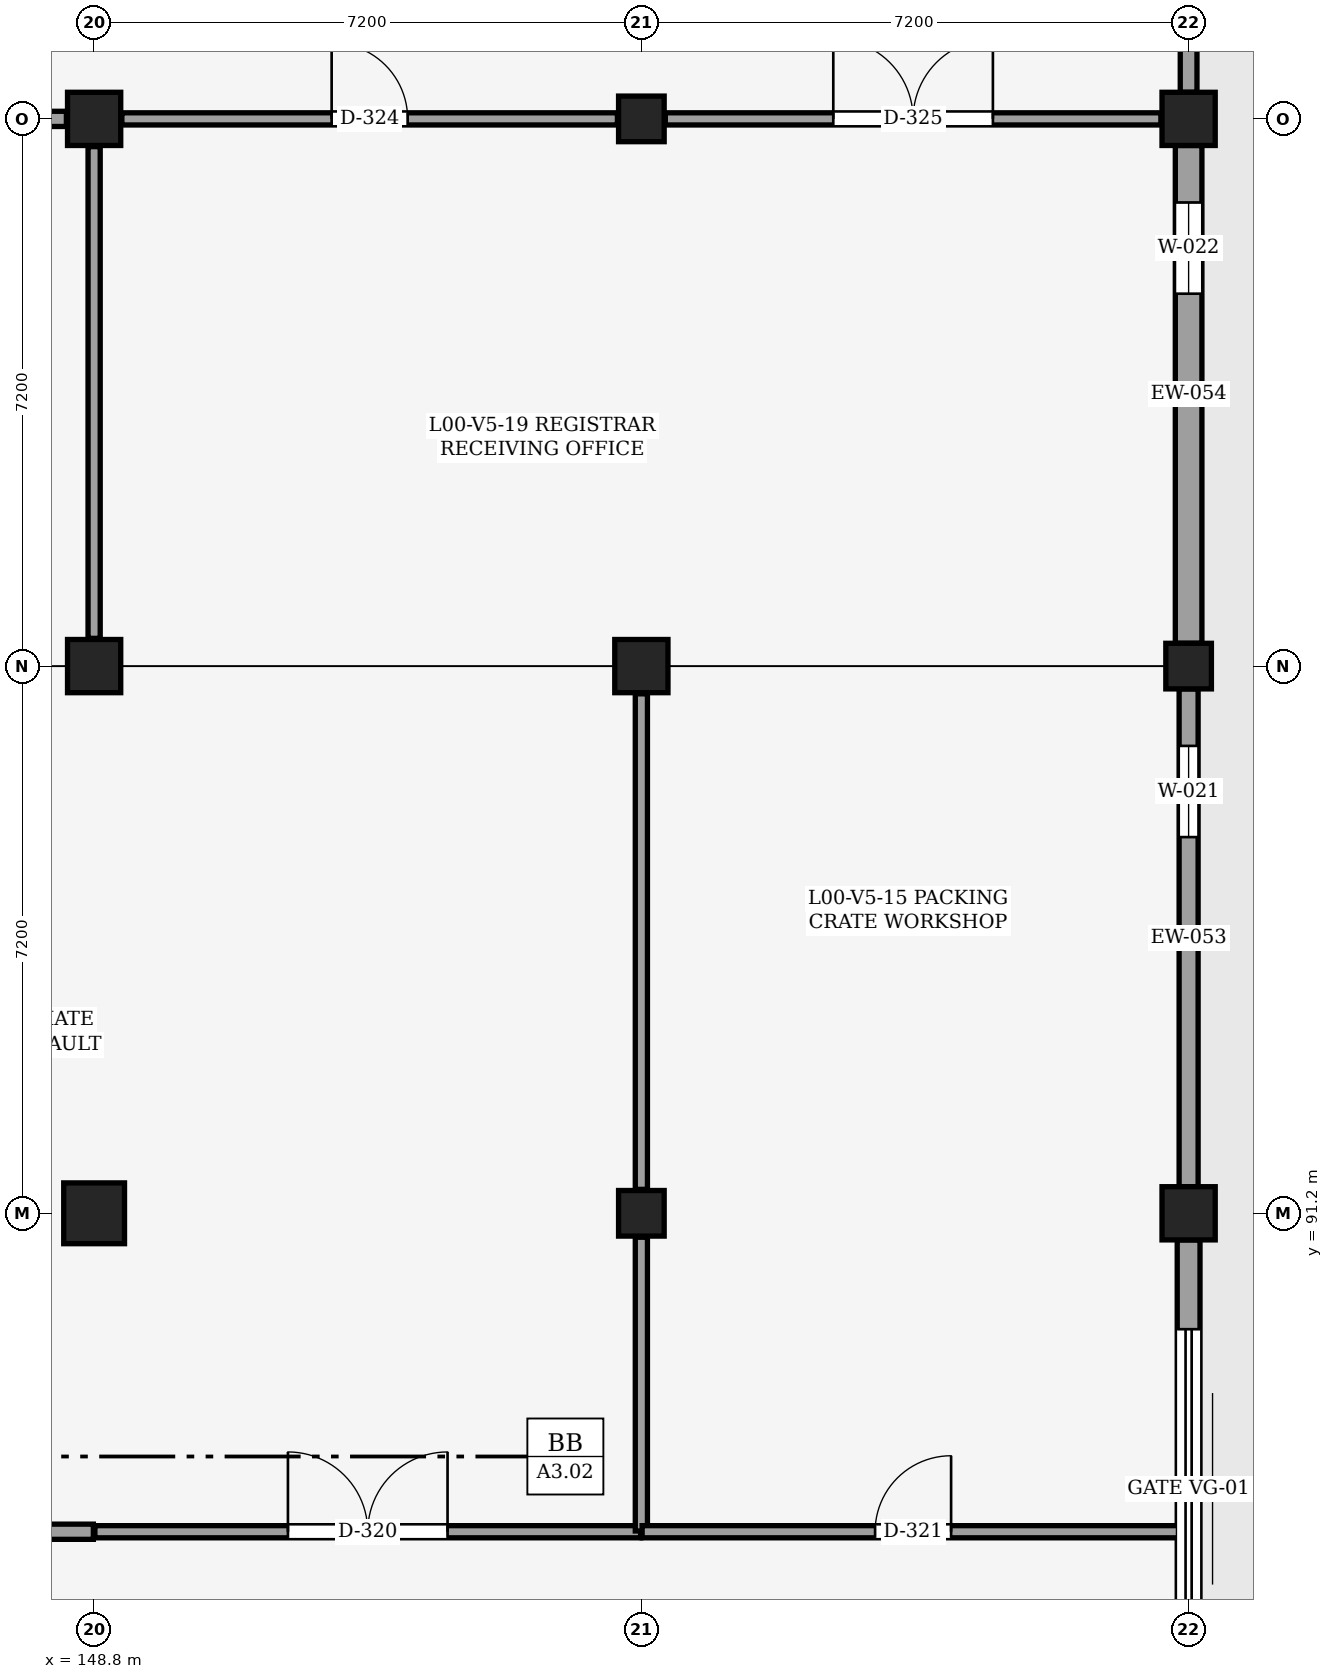
"""IFC4 building model, lengths in metres.
Left out: names, types, materials, properties, quantities, classifications, styles, units other than length and angle.
Written with IfcOpenShell. Run it as: python <this file> out.ifc"""

import sys

from ifc_helpers import new_model, si_unit, direction, frame, frame_2d, origin, origin_2d, place, context, subcontext, project, spatial, rectangle, extrude, element, fill, save


model = new_model("IFC4")
c1 = context("Model", 3, precision=1e-05, world=origin(), true_north=direction((0.0, 1.0)))
c2 = subcontext(c1, "Body", "Model", "MODEL_VIEW")
j1 = project(units=[si_unit("LENGTHUNIT", "METRE"), si_unit("PLANEANGLEUNIT", "RADIAN")], contexts=[c1])
p1 = place(None, origin())
s1 = spatial("IfcSite", under=j1, at=p1, CompositionType="ELEMENT")
p2 = place(p1, origin())
s2 = spatial("IfcBuilding", under=s1, at=p2, CompositionType="ELEMENT")
p3 = place(p2, origin())
s3 = spatial("IfcBuildingStorey", under=s2, at=p3, CompositionType="ELEMENT", Elevation=0.0)
p4 = place(p3, frame((148.8, 91.2, 0.0), z_axis=(0.0, 0.0, 1.0), x_axis=(1.0, 0.0, 0.0)))
e1 = element("IfcColumn", 1, at=p4, inside=s3, PredefinedType="COLUMN", context=c2, shape_type="SweptSolid", body=[
    extrude(rectangle(XDim=0.8, YDim=0.8, at=origin_2d()), origin(), (0.0, 0.0, 1.0), 5.4),
])
for number, where, z_axis, x_axis in (
    (2, (148.8, 98.4, 0.0), (0.0, 0.0, 1.0), (1.0, 0.0, 0.0)),
    (3, (148.8, 105.6, 0.0), (0.0, 0.0, 1.0), (1.0, 0.0, 0.0)),
):
    element("IfcColumn", number, at=place(p3, frame(where, z_axis=z_axis, x_axis=x_axis)), inside=s3, PredefinedType="COLUMN", context=c2, shape_type="SweptSolid", body=[
        extrude(rectangle(XDim=0.7, YDim=0.7, at=origin_2d()), origin(), (0.0, 0.0, 1.0), 5.4),
    ])
p5 = place(p3, frame((156.0, 91.2, 0.0), z_axis=(0.0, 0.0, 1.0), x_axis=(1.0, 0.0, 0.0)))
e4 = element("IfcColumn", 4, at=p5, inside=s3, PredefinedType="COLUMN", context=c2, shape_type="SweptSolid", body=[
    extrude(rectangle(XDim=0.6, YDim=0.6, at=origin_2d()), origin(), (0.0, 0.0, 1.0), 5.4),
])
p6 = place(p3, frame((156.0, 98.4, 0.0), z_axis=(0.0, 0.0, 1.0), x_axis=(1.0, 0.0, 0.0)))
e5 = element("IfcColumn", 5, at=p6, inside=s3, PredefinedType="COLUMN", context=c2, shape_type="SweptSolid", body=[
    extrude(rectangle(XDim=0.7, YDim=0.7, at=origin_2d()), origin(), (0.0, 0.0, 1.0), 5.4),
])
p7 = place(p3, frame((156.0, 105.6, 0.0), z_axis=(0.0, 0.0, 1.0), x_axis=(1.0, 0.0, 0.0)))
e6 = element("IfcColumn", 6, at=p7, inside=s3, PredefinedType="COLUMN", context=c2, shape_type="SweptSolid", body=[
    extrude(rectangle(XDim=0.6, YDim=0.6, at=origin_2d()), origin(), (0.0, 0.0, 1.0), 5.4),
])
p8 = place(p3, frame((163.2, 91.2, 0.0), z_axis=(0.0, 0.0, 1.0), x_axis=(1.0, 0.0, 0.0)))
e7 = element("IfcColumn", 7, at=p8, inside=s3, PredefinedType="COLUMN", context=c2, shape_type="SweptSolid", body=[
    extrude(rectangle(XDim=0.7, YDim=0.7, at=origin_2d()), origin(), (0.0, 0.0, 1.0), 5.4),
])
p9 = place(p3, frame((163.2, 98.4, 0.0), z_axis=(0.0, 0.0, 1.0), x_axis=(1.0, 0.0, 0.0)))
e8 = element("IfcColumn", 8, at=p9, inside=s3, PredefinedType="COLUMN", context=c2, shape_type="SweptSolid", body=[
    extrude(rectangle(XDim=0.6, YDim=0.6, at=origin_2d()), origin(), (0.0, 0.0, 1.0), 5.4),
])
p10 = place(p3, frame((163.2, 105.6, 0.0), z_axis=(0.0, 0.0, 1.0), x_axis=(1.0, 0.0, 0.0)))
e9 = element("IfcColumn", 9, at=p10, inside=s3, PredefinedType="COLUMN", context=c2, shape_type="SweptSolid", body=[
    extrude(rectangle(XDim=0.7, YDim=0.7, at=origin_2d()), origin(), (0.0, 0.0, 1.0), 5.4),
])
p11 = place(p3, frame((163.2, 90.85, 0.0), z_axis=(0.0, 0.0, 1.0), x_axis=(0.0, -1.0, 0.0)))
e10 = element("IfcWall", 10, at=p11, inside=s3, PredefinedType="SOLIDWALL", context=c2, shape_type="SweptSolid", body=[
    extrude(rectangle(XDim=6.55, YDim=0.3, at=frame_2d((3.275, 0.0))), origin(), (0.0, 0.0, 1.0), 4.44),
])
p12 = place(p11, frame((1.175, 0.0, 0.0)))
e11 = element("IfcOpeningElement", 11, at=p12, cuts=e10, PredefinedType="OPENING", context=c2, shape_type="SweptSolid", body=[
    extrude(rectangle(XDim=4.2, YDim=3.85, at=frame_2d((2.1, 1.925))), frame((0.0, 0.16, 0.0), z_axis=(0.0, -1.0, 0.0), x_axis=(1.0, 0.0, 0.0)), (0.0, 0.0, 1.0), 0.321),
])
p13 = place(p3, frame((163.2, 98.1, 0.0), z_axis=(0.0, 0.0, 1.0), x_axis=(0.0, -1.0, 0.0)))
e12 = element("IfcWall", 12, at=p13, inside=s3, PredefinedType="SOLIDWALL", context=c2, shape_type="SweptSolid", body=[
    extrude(rectangle(XDim=6.55, YDim=0.25, at=frame_2d((3.275, 0.0))), origin(), (0.0, 0.0, 1.0), 4.29),
])
p14 = place(p13, frame((0.75, 0.0, 0.9)))
e13 = element("IfcOpeningElement", 13, at=p14, cuts=e12, PredefinedType="OPENING", context=c2, shape_type="SweptSolid", body=[
    extrude(rectangle(XDim=1.2, YDim=1.5, at=frame_2d((0.6, 0.75))), frame((0.0, 0.135, 0.0), z_axis=(0.0, -1.0, 0.0), x_axis=(1.0, 0.0, 0.0)), (0.0, 0.0, 1.0), 0.271),
])
p15 = place(p3, frame((163.2, 105.25, 0.0), z_axis=(0.0, 0.0, 1.0), x_axis=(0.0, -1.0, 0.0)))
e14 = element("IfcWall", 14, at=p15, inside=s3, PredefinedType="SOLIDWALL", context=c2, shape_type="SweptSolid", body=[
    extrude(rectangle(XDim=6.55, YDim=0.35, at=frame_2d((3.275, 0.0))), origin(), (0.0, 0.0, 1.0), 4.54),
])
p16 = place(p15, frame((0.75, 0.0, 0.9)))
e15 = element("IfcOpeningElement", 15, at=p16, cuts=e14, PredefinedType="OPENING", context=c2, shape_type="SweptSolid", body=[
    extrude(rectangle(XDim=1.2, YDim=1.5, at=frame_2d((0.6, 0.75))), frame((0.0, 0.185, 0.0), z_axis=(0.0, -1.0, 0.0), x_axis=(1.0, 0.0, 0.0)), (0.0, 0.0, 1.0), 0.371),
])
p17 = place(p3, frame((163.2, 112.5, 0.0), z_axis=(0.0, 0.0, 1.0), x_axis=(0.0, -1.0, 0.0)))
e16 = element("IfcWall", 16, at=p17, inside=s3, PredefinedType="SOLIDWALL", context=c2, shape_type="SweptSolid", body=[
    extrude(rectangle(XDim=6.55, YDim=0.22, at=frame_2d((3.275, 0.0))), origin(), (0.0, 0.0, 1.0), 4.54),
])
p18 = place(p17, frame((0.75, 0.0, 0.9)))
e17 = element("IfcOpeningElement", 17, at=p18, cuts=e16, PredefinedType="OPENING", context=c2, shape_type="SweptSolid", body=[
    extrude(rectangle(XDim=1.2, YDim=1.5, at=frame_2d((0.6, 0.75))), frame((0.0, 0.12, 0.0), z_axis=(0.0, -1.0, 0.0), x_axis=(1.0, 0.0, 0.0)), (0.0, 0.0, 1.0), 0.24),
])
p19 = place(p3, frame((141.61, 87.01, 0.0), z_axis=(0.0, 0.0, 1.0), x_axis=(1.0, 0.0, 0.0)))
e18 = element("IfcWall", 18, at=p19, inside=s3, PredefinedType="PARTITIONING", context=c2, shape_type="SweptSolid", body=[
    extrude(rectangle(XDim=7.18, YDim=0.2, at=frame_2d((3.59, 0.0))), origin(), (0.0, 0.0, 1.0), 5.14),
])
p20 = place(p19, frame((2.84, 0.0, 0.0)))
e19 = element("IfcOpeningElement", 19, at=p20, cuts=e18, PredefinedType="OPENING", context=c2, shape_type="SweptSolid", body=[
    extrude(rectangle(XDim=1.5, YDim=2.2, at=frame_2d((0.75, 1.1))), frame((0.0, 0.11, 0.0), z_axis=(0.0, -1.0, 0.0), x_axis=(1.0, 0.0, 0.0)), (0.0, 0.0, 1.0), 0.22),
])
p21 = place(p3, frame((148.81, 87.01, 0.0), z_axis=(0.0, 0.0, 1.0), x_axis=(1.0, 0.0, 0.0)))
e20 = element("IfcWall", 20, at=p21, inside=s3, PredefinedType="PARTITIONING", context=c2, shape_type="SweptSolid", body=[
    extrude(rectangle(XDim=7.18, YDim=0.16, at=frame_2d((3.59, 0.0))), origin(), (0.0, 0.0, 1.0), 5.14),
])
p22 = place(p21, frame((2.54, 0.0, 0.0)))
e21 = element("IfcOpeningElement", 21, at=p22, cuts=e20, PredefinedType="OPENING", context=c2, shape_type="SweptSolid", body=[
    extrude(rectangle(XDim=2.1, YDim=2.5, at=frame_2d((1.05, 1.25))), frame((0.0, 0.09, 0.0), z_axis=(0.0, -1.0, 0.0), x_axis=(1.0, 0.0, 0.0)), (0.0, 0.0, 1.0), 0.18),
])
p23 = place(p3, frame((156.0, 87.02, 0.0), z_axis=(0.0, 0.0, 1.0), x_axis=(0.0, 1.0, 0.0)))
e22 = element("IfcWall", 22, at=p23, inside=s3, PredefinedType="PARTITIONING", context=c2, shape_type="SweptSolid", body=[
    extrude(rectangle(XDim=3.865, YDim=0.16, at=frame_2d((1.933, 0.0))), origin(), (0.0, 0.0, 1.0), 4.54),
])
p24 = place(p3, frame((156.0, 91.515, 0.0), z_axis=(0.0, 0.0, 1.0), x_axis=(0.0, 1.0, 0.0)))
e23 = element("IfcWall", 23, at=p24, inside=s3, PredefinedType="PARTITIONING", context=c2, shape_type="SweptSolid", body=[
    extrude(rectangle(XDim=6.52, YDim=0.16, at=frame_2d((3.26, 0.0))), origin(), (0.0, 0.0, 1.0), 4.44),
])
p25 = place(p3, frame((156.01, 87.01, 0.0), z_axis=(0.0, 0.0, 1.0), x_axis=(1.0, 0.0, 0.0)))
e24 = element("IfcWall", 24, at=p25, inside=s3, PredefinedType="PARTITIONING", context=c2, shape_type="SweptSolid", body=[
    extrude(rectangle(XDim=7.13, YDim=0.16, at=frame_2d((3.565, 0.0))), origin(), (0.0, 0.0, 1.0), 5.14),
])
p26 = place(p25, frame((3.065, 0.0, 0.0)))
e25 = element("IfcOpeningElement", 25, at=p26, cuts=e24, PredefinedType="OPENING", context=c2, shape_type="SweptSolid", body=[
    extrude(rectangle(XDim=1.0, YDim=2.15, at=frame_2d((0.5, 1.075))), frame((0.0, 0.09, 0.0), z_axis=(0.0, -1.0, 0.0), x_axis=(1.0, 0.0, 0.0)), (0.0, 0.0, 1.0), 0.18),
])
p27 = place(p3, frame((141.915, 105.6, 0.0), z_axis=(0.0, 0.0, 1.0), x_axis=(1.0, 0.0, 0.0)))
e26 = element("IfcWall", 26, at=p27, inside=s3, PredefinedType="PARTITIONING", context=c2, shape_type="SweptSolid", body=[
    extrude(rectangle(XDim=6.52, YDim=0.2, at=frame_2d((3.26, 0.0))), origin(), (0.0, 0.0, 1.0), 4.607),
])
p28 = place(p27, frame((2.36, 0.0, 0.0)))
e27 = element("IfcOpeningElement", 27, at=p28, cuts=e26, PredefinedType="OPENING", context=c2, shape_type="SweptSolid", body=[
    extrude(rectangle(XDim=1.8, YDim=2.4, at=frame_2d((0.9, 1.2))), frame((0.0, 0.11, 0.0), z_axis=(0.0, -1.0, 0.0), x_axis=(1.0, 0.0, 0.0)), (0.0, 0.0, 1.0), 0.22),
])
p29 = place(p3, frame((148.8, 98.765, 0.0), z_axis=(0.0, 0.0, 1.0), x_axis=(0.0, 1.0, 0.0)))
e28 = element("IfcWall", 28, at=p29, inside=s3, PredefinedType="PARTITIONING", context=c2, shape_type="SweptSolid", body=[
    extrude(rectangle(XDim=6.47, YDim=0.16, at=frame_2d((3.235, 0.0))), origin(), (0.0, 0.0, 1.0), 4.38),
])
p30 = place(p3, frame((149.165, 105.6, 0.0), z_axis=(0.0, 0.0, 1.0), x_axis=(1.0, 0.0, 0.0)))
e29 = element("IfcWall", 29, at=p30, inside=s3, PredefinedType="PARTITIONING", context=c2, shape_type="SweptSolid", body=[
    extrude(rectangle(XDim=6.52, YDim=0.16, at=frame_2d((3.26, 0.0))), origin(), (0.0, 0.0, 1.0), 4.678),
])
p31 = place(p30, frame((2.76, 0.0, 0.0)))
e30 = element("IfcOpeningElement", 30, at=p31, cuts=e29, PredefinedType="OPENING", context=c2, shape_type="SweptSolid", body=[
    extrude(rectangle(XDim=1.0, YDim=2.15, at=frame_2d((0.5, 1.075))), frame((0.0, 0.09, 0.0), z_axis=(0.0, -1.0, 0.0), x_axis=(1.0, 0.0, 0.0)), (0.0, 0.0, 1.0), 0.18),
])
p32 = place(p3, frame((156.315, 105.6, 0.0), z_axis=(0.0, 0.0, 1.0), x_axis=(1.0, 0.0, 0.0)))
e31 = element("IfcWall", 31, at=p32, inside=s3, PredefinedType="PARTITIONING", context=c2, shape_type="SweptSolid", body=[
    extrude(rectangle(XDim=6.52, YDim=0.16, at=frame_2d((3.26, 0.0))), origin(), (0.0, 0.0, 1.0), 4.533),
])
p33 = place(p32, frame((2.21, 0.0, 0.0)))
e32 = element("IfcOpeningElement", 32, at=p33, cuts=e31, PredefinedType="OPENING", context=c2, shape_type="SweptSolid", body=[
    extrude(rectangle(XDim=2.1, YDim=2.5, at=frame_2d((1.05, 1.25))), frame((0.0, 0.09, 0.0), z_axis=(0.0, -1.0, 0.0), x_axis=(1.0, 0.0, 0.0)), (0.0, 0.0, 1.0), 0.18),
])
p34 = place(p12, origin())
e33 = element("IfcDoor", 33, at=p34, inside=s3, OperationType="ROLLINGUP", PredefinedType="GATE", context=c2, shape_type="SweptSolid", body=[
    extrude(rectangle(XDim=4.2, YDim=3.85, at=frame_2d((2.1, 1.925))), frame((0.0, 0.025, 0.0), z_axis=(0.0, -1.0, 0.0), x_axis=(1.0, 0.0, 0.0)), (0.0, 0.0, 1.0), 0.05),
])
fill(e11, e33)
p35 = place(p14, origin())
e34 = element("IfcWindow", 34, at=p35, inside=s3, PartitioningType="SINGLE_PANEL", PredefinedType="WINDOW", context=c2, shape_type="SweptSolid", body=[
    extrude(rectangle(XDim=1.2, YDim=1.5, at=frame_2d((0.6, 0.75))), frame((0.0, 0.03, 0.0), z_axis=(0.0, -1.0, 0.0), x_axis=(1.0, 0.0, 0.0)), (0.0, 0.0, 1.0), 0.06),
])
fill(e13, e34)
p36 = place(p16, origin())
e35 = element("IfcWindow", 35, at=p36, inside=s3, PartitioningType="SINGLE_PANEL", PredefinedType="WINDOW", context=c2, shape_type="SweptSolid", body=[
    extrude(rectangle(XDim=1.2, YDim=1.5, at=frame_2d((0.6, 0.75))), frame((0.0, 0.03, 0.0), z_axis=(0.0, -1.0, 0.0), x_axis=(1.0, 0.0, 0.0)), (0.0, 0.0, 1.0), 0.06),
])
fill(e15, e35)
p37 = place(p22, origin())
e36 = element("IfcDoor", 36, at=p37, inside=s3, OperationType="DOUBLE_DOOR_SINGLE_SWING", PredefinedType="DOOR", context=c2, shape_type="SweptSolid", body=[
    extrude(rectangle(XDim=2.1, YDim=2.5, at=frame_2d((1.05, 1.25))), frame((0.0, 0.025, 0.0), z_axis=(0.0, -1.0, 0.0), x_axis=(1.0, 0.0, 0.0)), (0.0, 0.0, 1.0), 0.05),
])
fill(e21, e36)
p38 = place(p26, origin())
e37 = element("IfcDoor", 37, at=p38, inside=s3, OperationType="SINGLE_SWING_RIGHT", PredefinedType="DOOR", context=c2, shape_type="SweptSolid", body=[
    extrude(rectangle(XDim=1.0, YDim=2.15, at=frame_2d((0.5, 1.075))), frame((0.0, 0.025, 0.0), z_axis=(0.0, -1.0, 0.0), x_axis=(1.0, 0.0, 0.0)), (0.0, 0.0, 1.0), 0.05),
])
fill(e25, e37)
p39 = place(p31, origin())
e38 = element("IfcDoor", 38, at=p39, inside=s3, OperationType="SINGLE_SWING_LEFT", PredefinedType="DOOR", context=c2, shape_type="SweptSolid", body=[
    extrude(rectangle(XDim=1.0, YDim=2.15, at=frame_2d((0.5, 1.075))), frame((0.0, 0.025, 0.0), z_axis=(0.0, -1.0, 0.0), x_axis=(1.0, 0.0, 0.0)), (0.0, 0.0, 1.0), 0.05),
])
fill(e30, e38)
p40 = place(p33, origin())
e39 = element("IfcDoor", 39, at=p40, inside=s3, OperationType="DOUBLE_DOOR_SINGLE_SWING", PredefinedType="DOOR", context=c2, shape_type="SweptSolid", body=[
    extrude(rectangle(XDim=2.1, YDim=2.5, at=frame_2d((1.05, 1.25))), frame((0.0, 0.025, 0.0), z_axis=(0.0, -1.0, 0.0), x_axis=(1.0, 0.0, 0.0)), (0.0, 0.0, 1.0), 0.05),
])
fill(e32, e39)
save(model, sys.argv[1])
